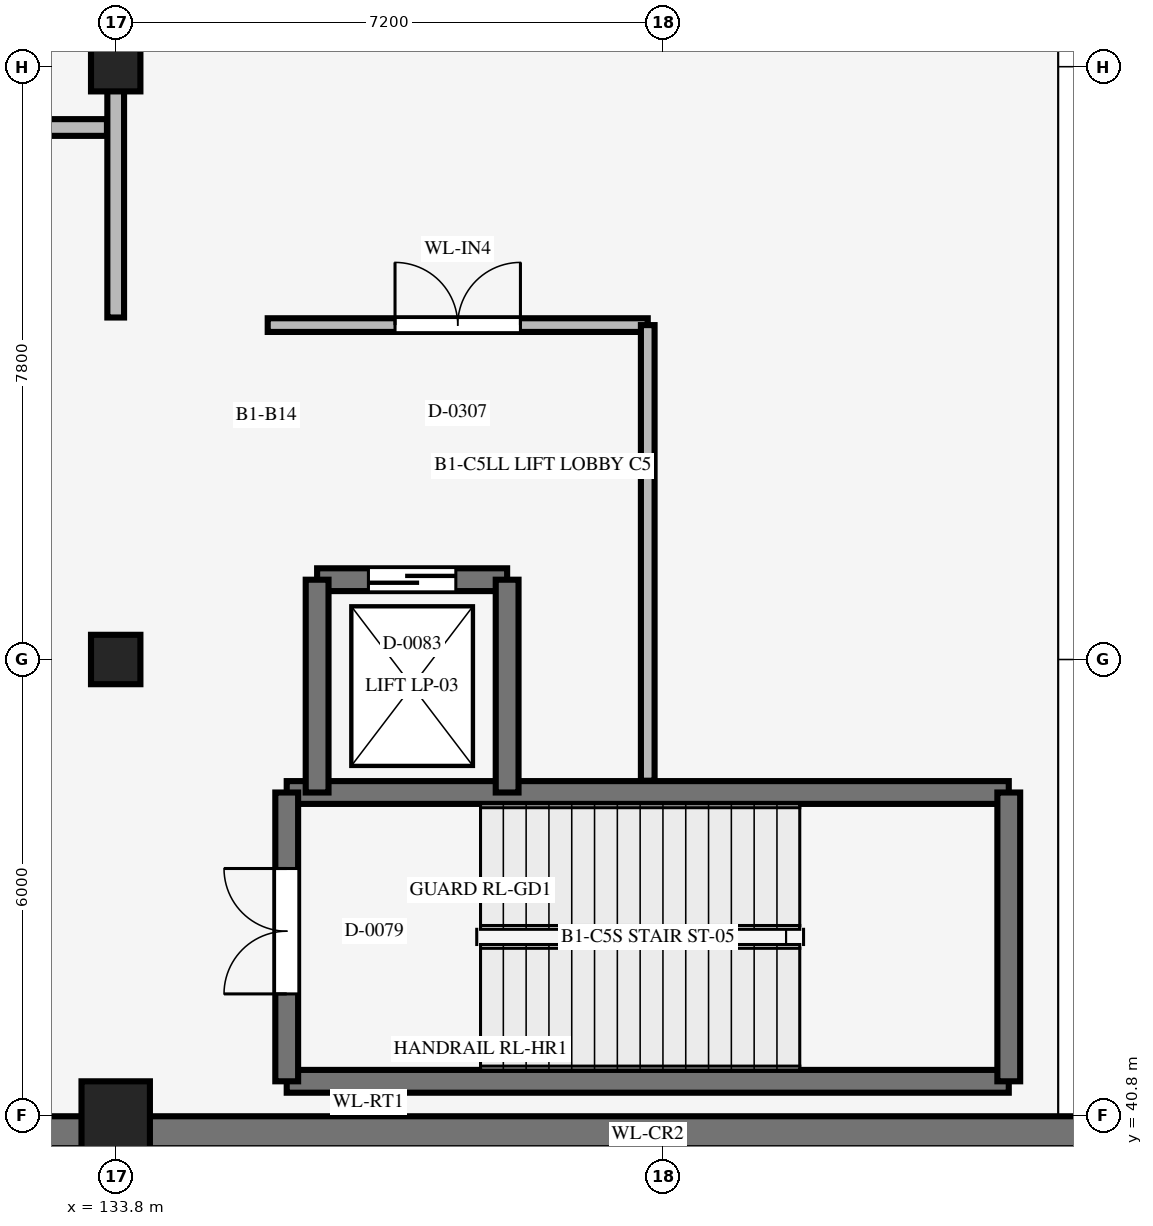
"""IFC4 building model, lengths in metres.
Left out: names, types, materials, properties, quantities, classifications, styles, units other than length and angle.
Written with IfcOpenShell. Run it as: python <this file> out.ifc"""

import sys

from ifc_helpers import new_model, si_unit, direction, frame, frame_2d, origin, origin_2d, place, context, subcontext, project, spatial, rectangle, extrude, element, fill, save


model = new_model("IFC4")
c1 = context("Model", 3, precision=1e-05, world=origin(), true_north=direction((0.0, 1.0)))
c2 = subcontext(c1, "Body", "Model", "MODEL_VIEW")
j1 = project(units=[si_unit("LENGTHUNIT", "METRE"), si_unit("PLANEANGLEUNIT", "RADIAN")], contexts=[c1])
p1 = place(None, origin())
s1 = spatial("IfcSite", under=j1, at=p1, CompositionType="ELEMENT")
p2 = place(p1, origin())
s2 = spatial("IfcBuilding", under=s1, at=p2, CompositionType="ELEMENT")
p3 = place(p2, frame((0.0, 0.0, -4.8)))
s3 = spatial("IfcBuildingStorey", under=s2, at=p3, CompositionType="ELEMENT", Elevation=-4.8)
p4 = place(p3, frame((133.8, 40.8, 0.0), z_axis=(0.0, 0.0, 1.0), x_axis=(1.0, 0.0, 0.0)))
e1 = element("IfcColumn", 1, at=p4, inside=s3, PredefinedType="COLUMN", context=c2, shape_type="SweptSolid", body=[
    extrude(rectangle(XDim=0.9, YDim=0.9, at=origin_2d()), origin(), (0.0, 0.0, 1.0), 4.8),
])
for number, where, z_axis, x_axis in (
    (2, (133.8, 46.8, 0.0), (0.0, 0.0, 1.0), (1.0, 0.0, 0.0)),
    (3, (133.8, 54.6, 0.0), (0.0, 0.0, 1.0), (1.0, 0.0, 0.0)),
):
    element("IfcColumn", number, at=place(p3, frame(where, z_axis=z_axis, x_axis=x_axis)), inside=s3, PredefinedType="COLUMN", context=c2, shape_type="SweptSolid", body=[
        extrude(rectangle(XDim=0.65, YDim=0.65, at=origin_2d()), origin(), (0.0, 0.0, 1.0), 4.8),
    ])
p5 = place(p3, frame((124.8, 40.58, 0.0), z_axis=(0.0, 0.0, 1.0), x_axis=(1.0, 0.0, 0.0)))
e4 = element("IfcWall", 4, at=p5, inside=s3, PredefinedType="USERDEFINED", context=c2, shape_type="SweptSolid", body=[
    extrude(rectangle(XDim=24.645, YDim=0.42, at=frame_2d((12.323, 0.0))), origin(), (0.0, 0.0, 1.0), 4.78),
])
for number, where, z_axis, x_axis in (
    (5, (145.55, 41.25, 0.0), (0.0, 0.0, 1.0), (-1.0, 0.0, 0.0)),
    (6, (136.05, 45.05, 0.0), (0.0, 0.0, 1.0), (1.0, 0.0, 0.0)),
):
    element("IfcWall", number, at=place(p3, frame(where, z_axis=z_axis, x_axis=x_axis)), inside=s3, PredefinedType="SHEAR", context=c2, shape_type="SweptSolid", body=[
        extrude(rectangle(XDim=9.5, YDim=0.3, at=frame_2d((4.75, 0.0))), origin(), (0.0, 0.0, 1.0), 4.8),
    ])
p6 = place(p3, frame((136.05, 41.25, 0.0), z_axis=(0.0, 0.0, 1.0), x_axis=(0.0, 1.0, 0.0)))
e7 = element("IfcWall", 7, at=p6, inside=s3, PredefinedType="SHEAR", context=c2, shape_type="SweptSolid", body=[
    extrude(rectangle(XDim=3.8, YDim=0.3, at=frame_2d((1.9, 0.0))), origin(), (0.0, 0.0, 1.0), 4.8),
])
p7 = place(p6, frame((1.15, 0.0, 0.0)))
e8 = element("IfcOpeningElement", 8, at=p7, cuts=e7, PredefinedType="OPENING", context=c2, shape_type="SweptSolid", body=[
    extrude(rectangle(XDim=1.65, YDim=2.2, at=frame_2d((0.825, 1.1))), frame((0.0, 0.16, 0.0), z_axis=(0.0, -1.0, 0.0), x_axis=(1.0, 0.0, 0.0)), (0.0, 0.0, 1.0), 0.32),
])
p8 = place(p3, frame((145.55, 41.25, 0.0), z_axis=(0.0, 0.0, 1.0), x_axis=(0.0, 1.0, 0.0)))
e9 = element("IfcWall", 9, at=p8, inside=s3, PredefinedType="SHEAR", context=c2, shape_type="SweptSolid", body=[
    extrude(rectangle(XDim=3.8, YDim=0.3, at=frame_2d((1.9, 0.0))), origin(), (0.0, 0.0, 1.0), 4.8),
])
p9 = place(p3, frame((136.45, 47.85, 0.0), z_axis=(0.0, 0.0, 1.0), x_axis=(1.0, 0.0, 0.0)))
e10 = element("IfcWall", 10, at=p9, inside=s3, PredefinedType="SHEAR", context=c2, shape_type="SweptSolid", body=[
    extrude(rectangle(XDim=2.5, YDim=0.3, at=frame_2d((1.25, 0.0))), origin(), (0.0, 0.0, 1.0), 4.48),
])
p10 = place(p9, frame((0.675, 0.0, 0.0)))
e11 = element("IfcOpeningElement", 11, at=p10, cuts=e10, PredefinedType="OPENING", context=c2, shape_type="SweptSolid", body=[
    extrude(rectangle(XDim=1.15, YDim=2.2, at=frame_2d((0.575, 1.1))), frame((0.0, 0.16, 0.0), z_axis=(0.0, -1.0, 0.0), x_axis=(1.0, 0.0, 0.0)), (0.0, 0.0, 1.0), 0.32),
])
for number, where, z_axis, x_axis in (
    (12, (136.45, 45.05, 0.0), (0.0, 0.0, 1.0), (0.0, 1.0, 0.0)),
    (13, (138.95, 45.05, 0.0), (0.0, 0.0, 1.0), (0.0, 1.0, 0.0)),
):
    element("IfcWall", number, at=place(p3, frame(where, z_axis=z_axis, x_axis=x_axis)), inside=s3, PredefinedType="SHEAR", context=c2, shape_type="SweptSolid", body=[
        extrude(rectangle(XDim=2.8, YDim=0.3, at=frame_2d((1.4, 0.0))), origin(), (0.0, 0.0, 1.0), 4.48),
    ])
p11 = place(p3, frame((106.69, 53.8, 0.0), z_axis=(0.0, 0.0, 1.0), x_axis=(1.0, 0.0, 0.0)))
e14 = element("IfcWall", 14, at=p11, inside=s3, PredefinedType="STANDARD", context=c2, shape_type="SweptSolid", body=[
    extrude(rectangle(XDim=26.995, YDim=0.22, at=frame_2d((13.498, 0.0))), origin(), (0.0, 0.0, 1.0), 3.1),
])
p12 = place(p11, frame((13.085, 0.0, 0.0)))
e15 = element("IfcOpeningElement", 15, at=p12, cuts=e14, PredefinedType="OPENING", context=c2, shape_type="SweptSolid", body=[
    extrude(rectangle(XDim=0.95, YDim=2.15, at=frame_2d((0.475, 1.075))), frame((0.0, 0.12, 0.0), z_axis=(0.0, -1.0, 0.0), x_axis=(1.0, 0.0, 0.0)), (0.0, 0.0, 1.0), 0.24),
])
p13 = place(p3, frame((133.8, 51.3, 0.0), z_axis=(0.0, 0.0, 1.0), x_axis=(0.0, 1.0, 0.0)))
e16 = element("IfcWall", 16, at=p13, inside=s3, PredefinedType="STANDARD", context=c2, shape_type="SweptSolid", body=[
    extrude(rectangle(XDim=6.7, YDim=0.22, at=frame_2d((3.35, 0.0))), origin(), (0.0, 0.0, 1.0), 3.1),
])
p14 = place(p13, frame((3.775, 0.0, 0.0)))
e17 = element("IfcOpeningElement", 17, at=p14, cuts=e16, PredefinedType="OPENING", context=c2, shape_type="SweptSolid", body=[
    extrude(rectangle(XDim=1.85, YDim=2.25, at=frame_2d((0.925, 1.125))), frame((0.0, 0.12, 0.0), z_axis=(0.0, -1.0, 0.0), x_axis=(1.0, 0.0, 0.0)), (0.0, 0.0, 1.0), 0.24),
])
p15 = place(p3, frame((135.8, 51.2, 0.0), z_axis=(0.0, 0.0, 1.0), x_axis=(1.0, 0.0, 0.0)))
e18 = element("IfcWall", 18, at=p15, inside=s3, PredefinedType="STANDARD", context=c2, shape_type="SweptSolid", body=[
    extrude(rectangle(XDim=5.0, YDim=0.18, at=frame_2d((2.5, 0.0))), origin(), (0.0, 0.0, 1.0), 3.1),
])
p16 = place(p15, frame((1.675, 0.0, 0.0)))
e19 = element("IfcOpeningElement", 19, at=p16, cuts=e18, PredefinedType="OPENING", context=c2, shape_type="SweptSolid", body=[
    extrude(rectangle(XDim=1.65, YDim=2.2, at=frame_2d((0.825, 1.1))), frame((0.0, 0.1, 0.0), z_axis=(0.0, -1.0, 0.0), x_axis=(1.0, 0.0, 0.0)), (0.0, 0.0, 1.0), 0.2),
])
p17 = place(p3, frame((140.8, 45.205, 0.0), z_axis=(0.0, 0.0, 1.0), x_axis=(0.0, 1.0, 0.0)))
e20 = element("IfcWall", 20, at=p17, inside=s3, PredefinedType="STANDARD", context=c2, shape_type="SweptSolid", body=[
    extrude(rectangle(XDim=5.995, YDim=0.18, at=frame_2d((2.998, 0.0))), origin(), (0.0, 0.0, 1.0), 3.1),
])
p18 = place(p7, origin())
e21 = element("IfcDoor", 21, at=p18, inside=s3, OperationType="DOUBLE_DOOR_SINGLE_SWING", PredefinedType="DOOR", context=c2, shape_type="SweptSolid", body=[
    extrude(rectangle(XDim=1.65, YDim=2.2, at=frame_2d((0.825, 1.1))), frame((0.0, 0.025, 0.0), z_axis=(0.0, -1.0, 0.0), x_axis=(1.0, 0.0, 0.0)), (0.0, 0.0, 1.0), 0.05),
])
fill(e8, e21)
p19 = place(p10, origin())
e22 = element("IfcDoor", 22, at=p19, inside=s3, OperationType="DOUBLE_DOOR_SLIDING", PredefinedType="DOOR", context=c2, shape_type="SweptSolid", body=[
    extrude(rectangle(XDim=1.15, YDim=2.2, at=frame_2d((0.575, 1.1))), frame((0.0, 0.025, 0.0), z_axis=(0.0, -1.0, 0.0), x_axis=(1.0, 0.0, 0.0)), (0.0, 0.0, 1.0), 0.05),
])
fill(e11, e22)
p20 = place(p16, origin())
e23 = element("IfcDoor", 23, at=p20, inside=s3, OperationType="DOUBLE_DOOR_SINGLE_SWING", PredefinedType="DOOR", context=c2, shape_type="SweptSolid", body=[
    extrude(rectangle(XDim=1.65, YDim=2.2, at=frame_2d((0.825, 1.1))), frame((0.0, 0.025, 0.0), z_axis=(0.0, -1.0, 0.0), x_axis=(1.0, 0.0, 0.0)), (0.0, 0.0, 1.0), 0.05),
])
fill(e19, e23)
save(model, sys.argv[1])
